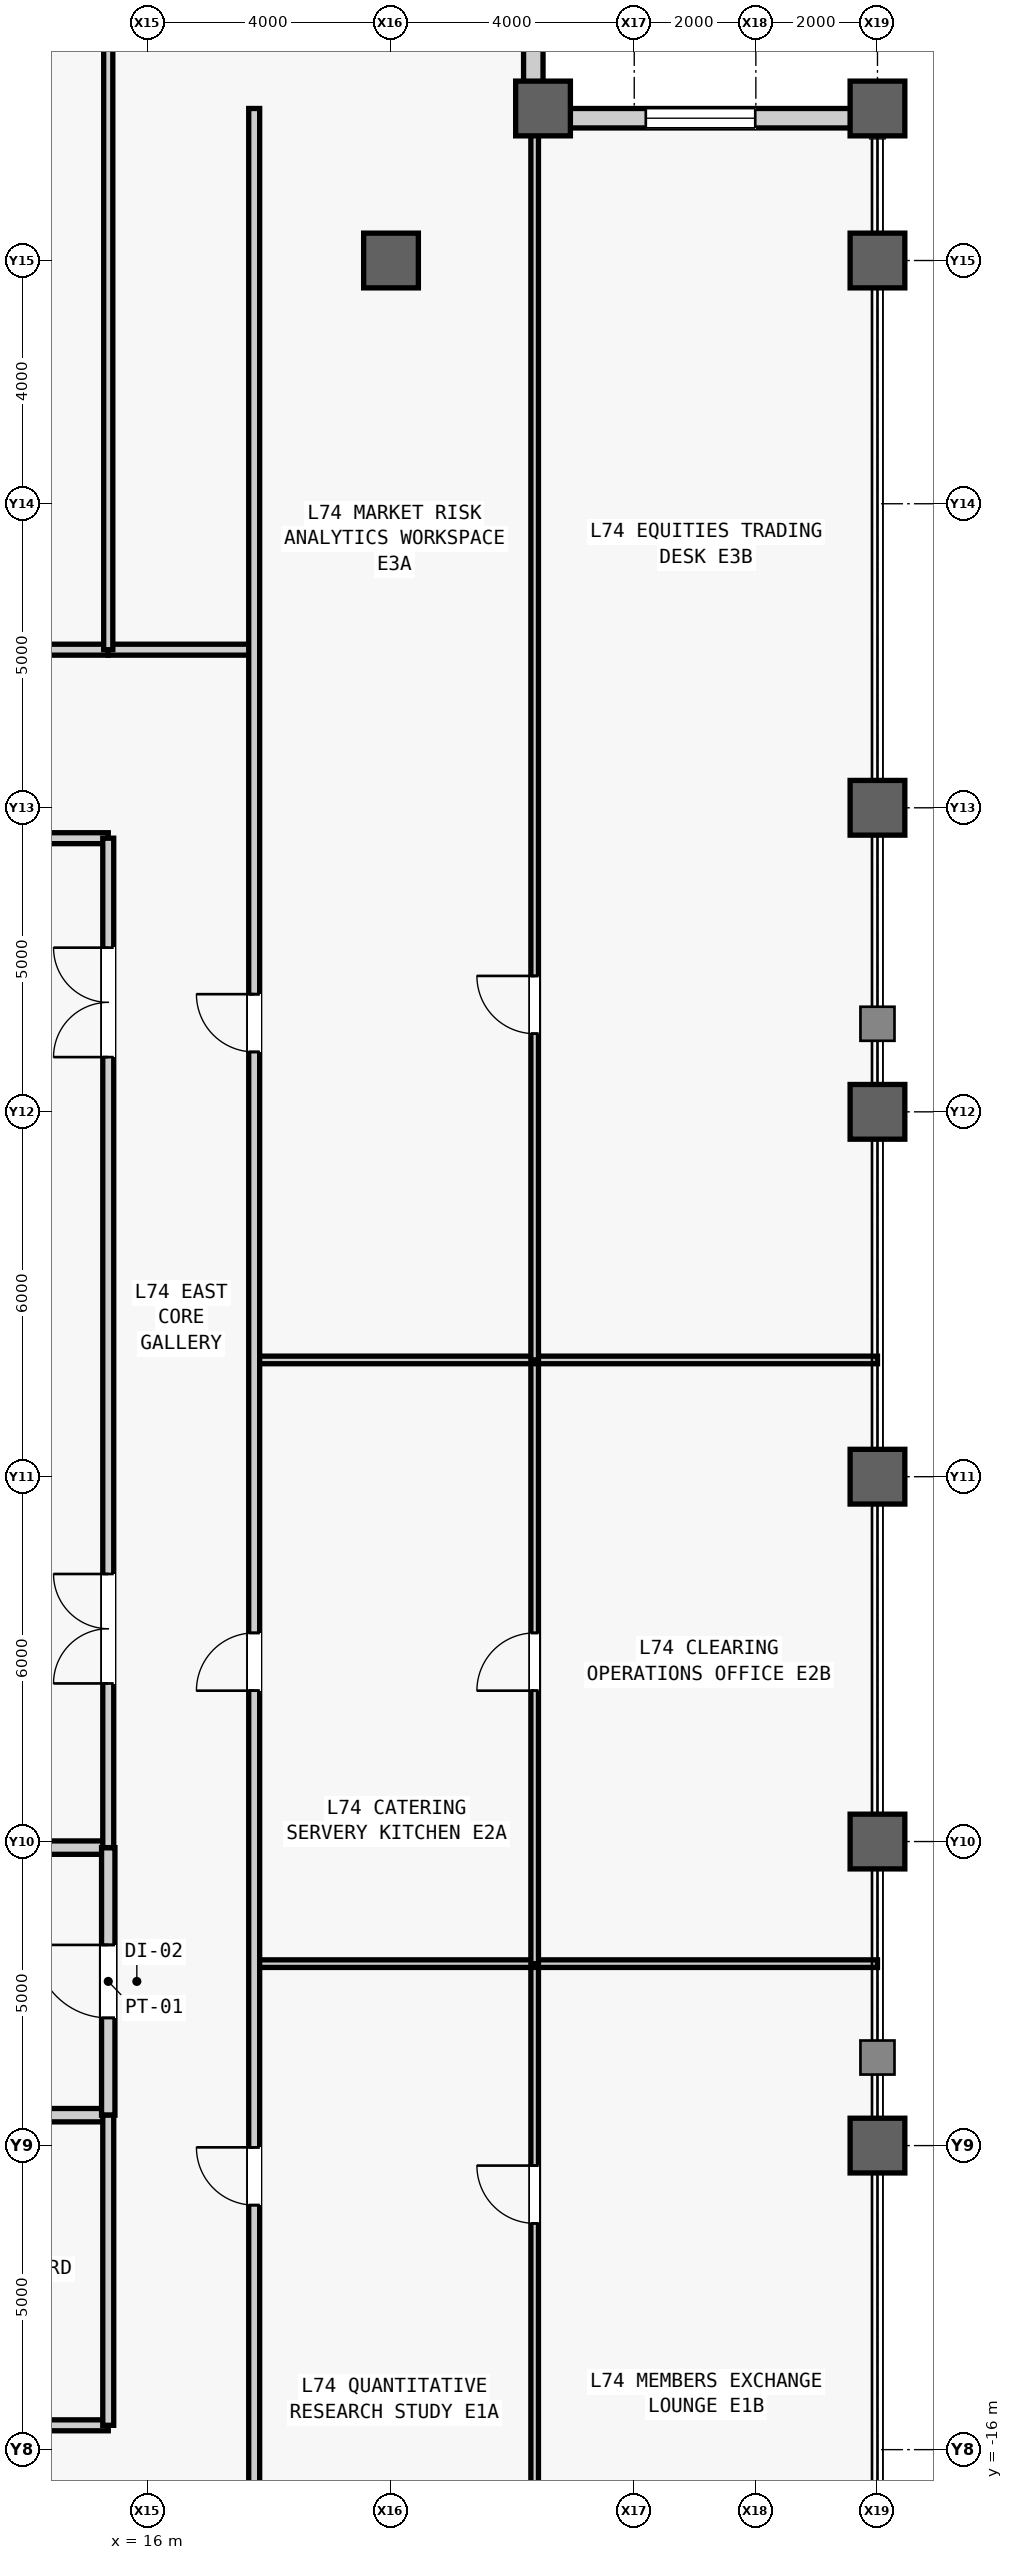
"""IFC4 building model, lengths in metres.
Left out: names, types, materials, properties, quantities, classifications, styles, units other than length and angle.
Written with IfcOpenShell. Run it as: python <this file> out.ifc"""

import sys

from ifc_helpers import new_model, si_unit, direction, frame, frame_2d, origin, origin_2d, place, context, subcontext, project, spatial, rectangle, hollow_rectangle, extrude, source, transform, mapped, element, fill, save


model = new_model("IFC4")
c1 = context("Model", 3, precision=1e-05, world=origin(), true_north=direction((0.0, 1.0)))
c2 = subcontext(c1, "Body", "Model", "MODEL_VIEW")
j1 = project(units=[si_unit("LENGTHUNIT", "METRE"), si_unit("PLANEANGLEUNIT", "RADIAN")], contexts=[c1])
p1 = place(None, origin())
s1 = spatial("IfcSite", under=j1, at=p1, CompositionType="ELEMENT")
p2 = place(p1, origin())
s2 = spatial("IfcBuilding", under=s1, at=p2, CompositionType="ELEMENT")
p3 = place(p2, frame((0.0, 0.0, 313.5)))
s3 = spatial("IfcBuildingStorey", under=s2, at=p3, CompositionType="ELEMENT", Elevation=313.5)
m1 = source(origin(), c2, "Body", "SweptSolid", [
    extrude(hollow_rectangle(XDim=0.9, YDim=0.9, WallThickness=0.05, at=origin_2d()), origin(), (0.0, 0.0, 1.0), 4.0),
])
for number, where, z_axis, x_axis in (
    (1, (20.0, 20.0, 0.0), (0.0, 0.0, 1.0), (1.0, 0.0, 0.0)),
    (2, (22.5, 22.5, 0.0), (0.0, 0.0, 1.0), (1.0, 0.0, 0.0)),
    (3, (28.0, -11.0, 0.0), (0.0, 0.0, 1.0), (1.0, 0.0, 0.0)),
    (4, (28.0, -6.0, 0.0), (0.0, 0.0, 1.0), (1.0, 0.0, 0.0)),
    (5, (28.0, 0.0, 0.0), (0.0, 0.0, 1.0), (1.0, 0.0, 0.0)),
    (6, (28.0, 6.0, 0.0), (0.0, 0.0, 1.0), (1.0, 0.0, 0.0)),
    (7, (28.0, 11.0, 0.0), (0.0, 0.0, 1.0), (1.0, 0.0, 0.0)),
    (8, (28.0, 20.0, 0.0), (0.0, 0.0, 1.0), (1.0, 0.0, 0.0)),
    (9, (28.0, 22.5, 0.0), (0.0, 0.0, 1.0), (1.0, 0.0, 0.0)),
):
    element("IfcColumn", number, at=place(p3, frame(where, z_axis=z_axis, x_axis=x_axis)), inside=s3, PredefinedType="COLUMN", context=c2, shape_type="MappedRepresentation", body=[
        mapped(m1, transform((0.0, 0.0, 0.0), scale=1.0)),
    ])
m2 = source(origin(), c2, "Body", "SweptSolid", [
    extrude(rectangle(XDim=5.18, YDim=0.32, at=frame_2d((2.59, 0.0))), origin(), (0.0, 0.0, 1.0), 3.231),
])
p4 = place(p3, frame((22.5, 22.34, 0.0), z_axis=(0.0, 0.0, 1.0), x_axis=(1.0, 0.0, 0.0)))
e10 = element("IfcWall", 10, at=p4, inside=s3, PredefinedType="STANDARD", context=c2, shape_type="MappedRepresentation", body=[
    mapped(m2, transform((0.0, 0.0, 0.0), scale=1.0)),
])
m3 = source(origin(), c2, "Body", "SweptSolid", [
    extrude(rectangle(XDim=1.8, YDim=2.4, at=frame_2d((0.9, 1.2))), frame((0.0, 0.17, 0.0), z_axis=(0.0, -1.0, 0.0), x_axis=(1.0, 0.0, 0.0)), (0.0, 0.0, 1.0), 0.34),
])
p5 = place(p4, frame((1.69, 0.0, 0.5)))
e11 = element("IfcOpeningElement", 11, at=p5, cuts=e10, PredefinedType="OPENING", context=c2, shape_type="MappedRepresentation", body=[
    mapped(m3, transform((0.0, 0.0, 0.0), scale=1.0)),
])
p6 = place(p3, frame((22.34, 22.5, 0.0), z_axis=(0.0, 0.0, 1.0), x_axis=(0.0, 1.0, 0.0)))
e12 = element("IfcWall", 12, at=p6, inside=s3, PredefinedType="STANDARD", context=c2, shape_type="MappedRepresentation", body=[
    mapped(m2, transform((0.0, 0.0, 0.0), scale=1.0)),
])
p7 = place(p6, frame((1.69, 0.0, 0.5)))
e13 = element("IfcOpeningElement", 13, at=p7, cuts=e12, PredefinedType="OPENING", context=c2, shape_type="MappedRepresentation", body=[
    mapped(m3, transform((0.0, 0.0, 0.0), scale=1.0)),
])
m4 = source(origin(), c2, "Body", "SweptSolid", [
    extrude(rectangle(XDim=4.05, YDim=0.22, at=frame_2d((2.025, 0.0))), origin(), (0.0, 0.0, 1.0), 3.78),
])
p8 = place(p3, frame((11.3, -10.5, 0.0), z_axis=(0.0, 0.0, 1.0), x_axis=(1.0, 0.0, 0.0)))
e14 = element("IfcWall", 14, at=p8, inside=s3, PredefinedType="PARTITIONING", context=c2, shape_type="MappedRepresentation", body=[
    mapped(m4, transform((0.0, 0.0, 0.0), scale=1.0)),
])
m5 = source(origin(), c2, "Body", "SweptSolid", [
    extrude(rectangle(XDim=4.05, YDim=0.22, at=frame_2d((2.025, 0.0))), origin(), (0.0, 0.0, 1.0), 3.085),
])
p9 = place(p3, frame((11.3, -6.1, 0.0), z_axis=(0.0, 0.0, 1.0), x_axis=(1.0, 0.0, 0.0)))
e15 = element("IfcWall", 15, at=p9, inside=s3, PredefinedType="PARTITIONING", context=c2, shape_type="MappedRepresentation", body=[
    mapped(m5, transform((0.0, 0.0, 0.0), scale=1.0)),
])
m6 = source(origin(), c2, "Body", "SweptSolid", [
    extrude(rectangle(XDim=4.4, YDim=0.22, at=frame_2d((2.2, 0.0))), origin(), (0.0, 0.0, 1.0), 3.78),
])
p10 = place(p3, frame((15.35, -10.5, 0.0), z_axis=(0.0, 0.0, 1.0), x_axis=(0.0, 1.0, 0.0)))
e16 = element("IfcWall", 16, at=p10, inside=s3, PredefinedType="PARTITIONING", context=c2, shape_type="MappedRepresentation", body=[
    mapped(m6, transform((0.0, 0.0, 0.0), scale=1.0)),
])
m7 = source(origin(), c2, "Body", "SweptSolid", [
    extrude(rectangle(XDim=1.2, YDim=2.2, at=frame_2d((0.6, 1.1))), frame((0.0, 0.12, 0.0), z_axis=(0.0, -1.0, 0.0), x_axis=(1.0, 0.0, 0.0)), (0.0, 0.0, 1.0), 0.24),
])
p11 = place(p10, frame((1.6, 0.0, 0.0)))
e17 = element("IfcOpeningElement", 17, at=p11, cuts=e16, PredefinedType="OPENING", context=c2, shape_type="MappedRepresentation", body=[
    mapped(m7, transform((0.0, 0.0, 0.0), scale=1.0)),
])
m8 = source(origin(), c2, "Body", "SweptSolid", [
    extrude(rectangle(XDim=4.05, YDim=0.18, at=frame_2d((2.025, 0.0))), origin(), (0.0, 0.0, 1.0), 3.78),
])
p12 = place(p3, frame((11.3, 10.5, 0.0), z_axis=(0.0, 0.0, 1.0), x_axis=(1.0, 0.0, 0.0)))
e18 = element("IfcWall", 18, at=p12, inside=s3, PredefinedType="PARTITIONING", context=c2, shape_type="MappedRepresentation", body=[
    mapped(m8, transform((0.0, 0.0, 0.0), scale=1.0)),
])
m9 = source(origin(), c2, "Body", "SweptSolid", [
    extrude(rectangle(XDim=16.6, YDim=0.18, at=frame_2d((8.3, 0.0))), origin(), (0.0, 0.0, 1.0), 3.78),
])
p13 = place(p3, frame((15.35, -6.1, 0.0), z_axis=(0.0, 0.0, 1.0), x_axis=(0.0, 1.0, 0.0)))
e19 = element("IfcWall", 19, at=p13, inside=s3, PredefinedType="PARTITIONING", context=c2, shape_type="MappedRepresentation", body=[
    mapped(m9, transform((0.0, 0.0, 0.0), scale=1.0)),
])
m10 = source(origin(), c2, "Body", "SweptSolid", [
    extrude(rectangle(XDim=1.8, YDim=2.25, at=frame_2d((0.9, 1.125))), frame((0.0, 0.1, 0.0), z_axis=(0.0, -1.0, 0.0), x_axis=(1.0, 0.0, 0.0)), (0.0, 0.0, 1.0), 0.2),
])
p14 = place(p13, frame((2.7, 0.0, 0.0)))
e20 = element("IfcOpeningElement", 20, at=p14, cuts=e19, PredefinedType="OPENING", context=c2, shape_type="MappedRepresentation", body=[
    mapped(m10, transform((0.0, 0.0, 0.0), scale=1.0)),
])
p15 = place(p13, frame((13.0, 0.0, 0.0)))
e21 = element("IfcOpeningElement", 21, at=p15, cuts=e19, PredefinedType="OPENING", context=c2, shape_type="MappedRepresentation", body=[
    mapped(m10, transform((0.0, 0.0, 0.0), scale=1.0)),
])
m11 = source(origin(), c2, "Body", "SweptSolid", [
    extrude(rectangle(XDim=14.05, YDim=0.18, at=frame_2d((7.025, 0.0))), origin(), (0.0, 0.0, 1.0), 3.78),
])
p16 = place(p3, frame((1.3, -15.6, 0.0), z_axis=(0.0, 0.0, 1.0), x_axis=(1.0, 0.0, 0.0)))
e22 = element("IfcWall", 22, at=p16, inside=s3, PredefinedType="PARTITIONING", context=c2, shape_type="MappedRepresentation", body=[
    mapped(m11, transform((0.0, 0.0, 0.0), scale=1.0)),
])
m12 = source(origin(), c2, "Body", "SweptSolid", [
    extrude(rectangle(XDim=0.9, YDim=2.15, at=frame_2d((0.45, 1.075))), frame((0.0, 0.1, 0.0), z_axis=(0.0, -1.0, 0.0), x_axis=(1.0, 0.0, 0.0)), (0.0, 0.0, 1.0), 0.2),
])
p17 = place(p16, frame((6.25, 0.0, 0.0)))
e23 = element("IfcOpeningElement", 23, at=p17, cuts=e22, PredefinedType="OPENING", context=c2, shape_type="MappedRepresentation", body=[
    mapped(m12, transform((0.0, 0.0, 0.0), scale=1.0)),
])
m13 = source(origin(), c2, "Body", "SweptSolid", [
    extrude(rectangle(XDim=5.1, YDim=0.18, at=frame_2d((2.55, 0.0))), origin(), (0.0, 0.0, 1.0), 3.78),
])
p18 = place(p3, frame((15.35, -15.6, 0.0), z_axis=(0.0, 0.0, 1.0), x_axis=(0.0, 1.0, 0.0)))
e24 = element("IfcWall", 24, at=p18, inside=s3, PredefinedType="PARTITIONING", context=c2, shape_type="MappedRepresentation", body=[
    mapped(m13, transform((0.0, 0.0, 0.0), scale=1.0)),
])
m14 = source(origin(), c2, "Body", "SweptSolid", [
    extrude(rectangle(XDim=2.4, YDim=0.18, at=frame_2d((1.2, 0.0))), origin(), (0.0, 0.0, 1.0), 3.78),
])
p19 = place(p3, frame((15.35, 13.6, 0.0), z_axis=(0.0, 0.0, 1.0), x_axis=(1.0, 0.0, 0.0)))
e25 = element("IfcWall", 25, at=p19, inside=s3, PredefinedType="PARTITIONING", context=c2, shape_type="MappedRepresentation", body=[
    mapped(m14, transform((0.0, 0.0, 0.0), scale=1.0)),
])
m15 = source(origin(), c2, "Body", "SweptSolid", [
    extrude(rectangle(XDim=32.75, YDim=0.18, at=frame_2d((16.375, 0.0))), origin(), (0.0, 0.0, 1.0), 3.78),
])
p20 = place(p3, frame((-17.4, 13.6, 0.0), z_axis=(0.0, 0.0, 1.0), x_axis=(1.0, 0.0, 0.0)))
e26 = element("IfcWall", 26, at=p20, inside=s3, PredefinedType="PARTITIONING", context=c2, shape_type="MappedRepresentation", body=[
    mapped(m15, transform((0.0, 0.0, 0.0), scale=1.0)),
])
m16 = source(origin(), c2, "Body", "SweptSolid", [
    extrude(rectangle(XDim=1.05, YDim=2.2, at=frame_2d((0.525, 1.1))), frame((0.0, 0.1, 0.0), z_axis=(0.0, -1.0, 0.0), x_axis=(1.0, 0.0, 0.0)), (0.0, 0.0, 1.0), 0.2),
])
p21 = place(p20, frame((27.075, 0.0, 0.0)))
e27 = element("IfcOpeningElement", 27, at=p21, cuts=e26, PredefinedType="OPENING", context=c2, shape_type="MappedRepresentation", body=[
    mapped(m16, transform((0.0, 0.0, 0.0), scale=1.0)),
])
m17 = source(origin(), c2, "Body", "SweptSolid", [
    extrude(rectangle(XDim=14.4, YDim=0.15, at=frame_2d((7.2, 0.0))), origin(), (0.0, 0.0, 1.0), 3.78),
])
p22 = place(p3, frame((15.35, 13.6, 0.0), z_axis=(0.0, 0.0, 1.0), x_axis=(0.0, 1.0, 0.0)))
e28 = element("IfcWall", 28, at=p22, inside=s3, PredefinedType="PARTITIONING", context=c2, shape_type="MappedRepresentation", body=[
    mapped(m17, transform((0.0, 0.0, 0.0), scale=1.0)),
])
m18 = source(origin(), c2, "Body", "SweptSolid", [
    extrude(rectangle(XDim=9.992, YDim=0.125, at=frame_2d((4.996, 0.0))), origin(), (0.0, 0.0, 1.0), 3.164),
])
p23 = place(p3, frame((22.363, -18.0, 0.0), z_axis=(0.0, 0.0, 1.0), x_axis=(0.0, 1.0, 0.0)))
e29 = element("IfcWall", 29, at=p23, inside=s3, PredefinedType="PARTITIONING", context=c2, shape_type="MappedRepresentation", body=[
    mapped(m18, transform((0.0, 0.0, 0.0), scale=1.0)),
])
m19 = source(origin(), c2, "Body", "SweptSolid", [
    extrude(rectangle(XDim=0.95, YDim=2.15, at=frame_2d((0.475, 1.075))), frame((0.0, 0.073, 0.0), z_axis=(0.0, -1.0, 0.0), x_axis=(1.0, 0.0, 0.0)), (0.0, 0.0, 1.0), 0.145),
])
p24 = place(p23, frame((5.721, 0.0, 0.0)))
e30 = element("IfcOpeningElement", 30, at=p24, cuts=e29, PredefinedType="OPENING", context=c2, shape_type="MappedRepresentation", body=[
    mapped(m19, transform((0.0, 0.0, 0.0), scale=1.0)),
])
m20 = source(origin(), c2, "Body", "SweptSolid", [
    extrude(rectangle(XDim=10.25, YDim=0.125, at=frame_2d((5.125, 0.0))), origin(), (0.0, 0.0, 1.0), 3.78),
])
p25 = place(p3, frame((17.75, -8.008, 0.0), z_axis=(0.0, 0.0, 1.0), x_axis=(1.0, 0.0, 0.0)))
e31 = element("IfcWall", 31, at=p25, inside=s3, PredefinedType="PARTITIONING", context=c2, shape_type="MappedRepresentation", body=[
    mapped(m20, transform((0.0, 0.0, 0.0), scale=1.0)),
])
m21 = source(origin(), c2, "Body", "SweptSolid", [
    extrude(rectangle(XDim=9.928, YDim=0.125, at=frame_2d((4.964, 0.0))), origin(), (0.0, 0.0, 1.0), 3.78),
])
p26 = place(p3, frame((22.363, -8.008, 0.0), z_axis=(0.0, 0.0, 1.0), x_axis=(0.0, 1.0, 0.0)))
e32 = element("IfcWall", 32, at=p26, inside=s3, PredefinedType="PARTITIONING", context=c2, shape_type="MappedRepresentation", body=[
    mapped(m21, transform((0.0, 0.0, 0.0), scale=1.0)),
])
p27 = place(p26, frame((4.489, 0.0, 0.0)))
e33 = element("IfcOpeningElement", 33, at=p27, cuts=e32, PredefinedType="OPENING", context=c2, shape_type="MappedRepresentation", body=[
    mapped(m19, transform((0.0, 0.0, 0.0), scale=1.0)),
])
p28 = place(p3, frame((17.75, 1.92, 0.0), z_axis=(0.0, 0.0, 1.0), x_axis=(1.0, 0.0, 0.0)))
e34 = element("IfcWall", 34, at=p28, inside=s3, PredefinedType="PARTITIONING", context=c2, shape_type="MappedRepresentation", body=[
    mapped(m20, transform((0.0, 0.0, 0.0), scale=1.0)),
])
m22 = source(origin(), c2, "Body", "SweptSolid", [
    extrude(rectangle(XDim=20.58, YDim=0.125, at=frame_2d((10.29, 0.0))), origin(), (0.0, 0.0, 1.0), 3.164),
])
p29 = place(p3, frame((22.363, 1.92, 0.0), z_axis=(0.0, 0.0, 1.0), x_axis=(0.0, 1.0, 0.0)))
e35 = element("IfcWall", 35, at=p29, inside=s3, PredefinedType="PARTITIONING", context=c2, shape_type="MappedRepresentation", body=[
    mapped(m22, transform((0.0, 0.0, 0.0), scale=1.0)),
])
p30 = place(p29, frame((5.365, 0.0, 0.0)))
e36 = element("IfcOpeningElement", 36, at=p30, cuts=e35, PredefinedType="OPENING", context=c2, shape_type="MappedRepresentation", body=[
    mapped(m19, transform((0.0, 0.0, 0.0), scale=1.0)),
])
m23 = source(origin(), c2, "Body", "SweptSolid", [
    extrude(rectangle(XDim=40.5, YDim=0.18, at=frame_2d((20.25, 0.0))), origin(), (0.0, 0.0, 1.0), 3.78),
])
p31 = place(p3, frame((17.75, -18.0, 0.0), z_axis=(0.0, 0.0, 1.0), x_axis=(0.0, 1.0, 0.0)))
e37 = element("IfcWall", 37, at=p31, inside=s3, PredefinedType="PARTITIONING", context=c2, shape_type="MappedRepresentation", body=[
    mapped(m23, transform((0.0, 0.0, 0.0), scale=1.0)),
])
m24 = source(origin(), c2, "Body", "SweptSolid", [
    extrude(rectangle(XDim=0.95, YDim=2.15, at=frame_2d((0.475, 1.075))), frame((0.0, 0.1, 0.0), z_axis=(0.0, -1.0, 0.0), x_axis=(1.0, 0.0, 0.0)), (0.0, 0.0, 1.0), 0.2),
])
p32 = place(p31, frame((6.021, 0.0, 0.0)))
e38 = element("IfcOpeningElement", 38, at=p32, cuts=e37, PredefinedType="OPENING", context=c2, shape_type="MappedRepresentation", body=[
    mapped(m24, transform((0.0, 0.0, 0.0), scale=1.0)),
])
p33 = place(p31, frame((14.481, 0.0, 0.0)))
e39 = element("IfcOpeningElement", 39, at=p33, cuts=e37, PredefinedType="OPENING", context=c2, shape_type="MappedRepresentation", body=[
    mapped(m24, transform((0.0, 0.0, 0.0), scale=1.0)),
])
p34 = place(p31, frame((24.985, 0.0, 0.0)))
e40 = element("IfcOpeningElement", 40, at=p34, cuts=e37, PredefinedType="OPENING", context=c2, shape_type="MappedRepresentation", body=[
    mapped(m24, transform((0.0, 0.0, 0.0), scale=1.0)),
])
m25 = source(origin(), c2, "Body", "SweptSolid", [
    extrude(rectangle(XDim=1.8, YDim=2.4, at=frame_2d((0.9, 1.2))), frame((0.0, 0.03, 0.0), z_axis=(0.0, -1.0, 0.0), x_axis=(1.0, 0.0, 0.0)), (0.0, 0.0, 1.0), 0.06),
])
p35 = place(p5, origin())
e41 = element("IfcWindow", 41, at=p35, inside=s3, PartitioningType="SINGLE_PANEL", PredefinedType="WINDOW", context=c2, shape_type="MappedRepresentation", body=[
    mapped(m25, transform((0.0, 0.0, 0.0), scale=1.0)),
])
fill(e11, e41)
m26 = source(origin(), c2, "Body", "SweptSolid", [
    extrude(rectangle(XDim=1.2, YDim=2.2, at=frame_2d((0.6, 1.1))), frame((0.0, 0.025, 0.0), z_axis=(0.0, -1.0, 0.0), x_axis=(1.0, 0.0, 0.0)), (0.0, 0.0, 1.0), 0.05),
])
p36 = place(p11, origin())
e42 = element("IfcDoor", 42, at=p36, inside=s3, OperationType="SINGLE_SWING_RIGHT", PredefinedType="DOOR", context=c2, shape_type="MappedRepresentation", body=[
    mapped(m26, transform((0.0, 0.0, 0.0), scale=1.0)),
])
fill(e17, e42)
m27 = source(origin(), c2, "Body", "SweptSolid", [
    extrude(rectangle(XDim=1.8, YDim=2.25, at=frame_2d((0.9, 1.125))), frame((0.0, 0.025, 0.0), z_axis=(0.0, -1.0, 0.0), x_axis=(1.0, 0.0, 0.0)), (0.0, 0.0, 1.0), 0.05),
])
p37 = place(p14, origin())
e43 = element("IfcDoor", 43, at=p37, inside=s3, OperationType="SINGLE_SWING_RIGHT", PredefinedType="DOOR", context=c2, shape_type="MappedRepresentation", body=[
    mapped(m27, transform((0.0, 0.0, 0.0), scale=1.0)),
])
fill(e20, e43)
p38 = place(p15, origin())
e44 = element("IfcDoor", 44, at=p38, inside=s3, OperationType="SINGLE_SWING_LEFT", PredefinedType="DOOR", context=c2, shape_type="MappedRepresentation", body=[
    mapped(m27, transform((0.0, 0.0, 0.0), scale=1.0)),
])
fill(e21, e44)
m28 = source(origin(), c2, "Body", "SweptSolid", [
    extrude(rectangle(XDim=0.95, YDim=2.15, at=frame_2d((0.475, 1.075))), frame((0.0, 0.025, 0.0), z_axis=(0.0, -1.0, 0.0), x_axis=(1.0, 0.0, 0.0)), (0.0, 0.0, 1.0), 0.05),
])
p39 = place(p24, origin())
e45 = element("IfcDoor", 45, at=p39, inside=s3, OperationType="SINGLE_SWING_RIGHT", PredefinedType="DOOR", context=c2, shape_type="MappedRepresentation", body=[
    mapped(m28, transform((0.0, 0.0, 0.0), scale=1.0)),
])
fill(e30, e45)
p40 = place(p27, origin())
e46 = element("IfcDoor", 46, at=p40, inside=s3, OperationType="SINGLE_SWING_LEFT", PredefinedType="DOOR", context=c2, shape_type="MappedRepresentation", body=[
    mapped(m28, transform((0.0, 0.0, 0.0), scale=1.0)),
])
fill(e33, e46)
p41 = place(p30, origin())
e47 = element("IfcDoor", 47, at=p41, inside=s3, OperationType="SINGLE_SWING_RIGHT", PredefinedType="DOOR", context=c2, shape_type="MappedRepresentation", body=[
    mapped(m28, transform((0.0, 0.0, 0.0), scale=1.0)),
])
fill(e36, e47)
p42 = place(p32, origin())
e48 = element("IfcDoor", 48, at=p42, inside=s3, OperationType="SINGLE_SWING_RIGHT", PredefinedType="DOOR", context=c2, shape_type="MappedRepresentation", body=[
    mapped(m28, transform((0.0, 0.0, 0.0), scale=1.0)),
])
fill(e38, e48)
p43 = place(p33, origin())
e49 = element("IfcDoor", 49, at=p43, inside=s3, OperationType="SINGLE_SWING_LEFT", PredefinedType="DOOR", context=c2, shape_type="MappedRepresentation", body=[
    mapped(m28, transform((0.0, 0.0, 0.0), scale=1.0)),
])
fill(e39, e49)
p44 = place(p34, origin())
e50 = element("IfcDoor", 50, at=p44, inside=s3, OperationType="SINGLE_SWING_RIGHT", PredefinedType="DOOR", context=c2, shape_type="MappedRepresentation", body=[
    mapped(m28, transform((0.0, 0.0, 0.0), scale=1.0)),
])
fill(e40, e50)
save(model, sys.argv[1])
